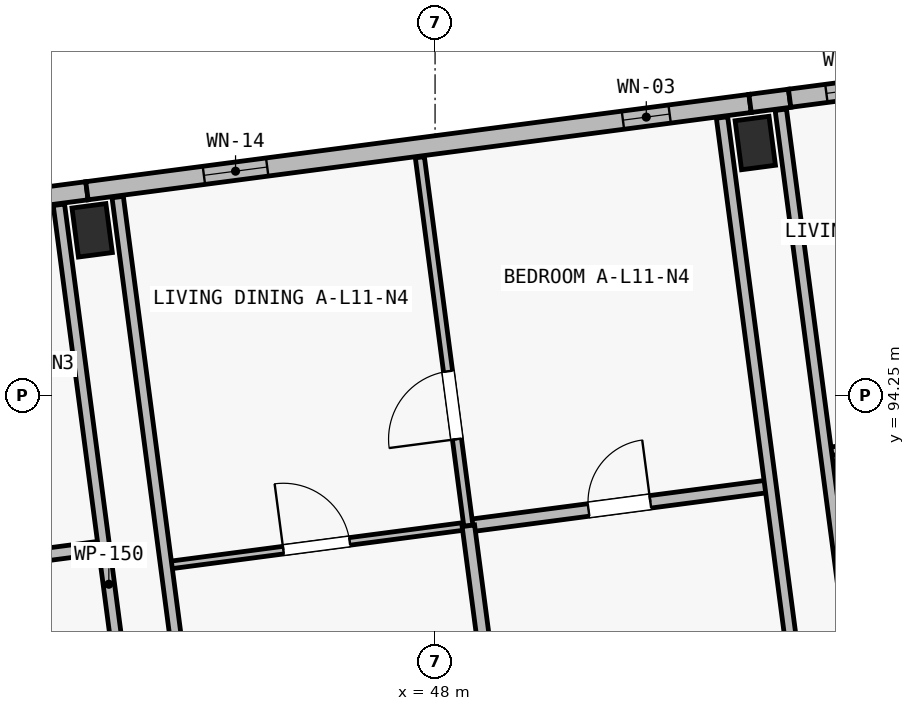
"""IFC4 building model, lengths in metres.
Left out: names, types, materials, properties, quantities, classifications, styles, units other than length and angle.
Written with IfcOpenShell. Run it as: python <this file> out.ifc"""

import sys

from ifc_helpers import new_model, si_unit, direction, frame, frame_2d, origin, origin_2d, place, context, subcontext, project, spatial, polyline, rectangle, outline, extrude, element, fill, save


model = new_model("IFC4")
c1 = context("Model", 3, precision=1e-05, world=origin(), true_north=direction((0.0, 1.0)))
c2 = subcontext(c1, "Body", "Model", "MODEL_VIEW")
j1 = project(units=[si_unit("LENGTHUNIT", "METRE"), si_unit("PLANEANGLEUNIT", "RADIAN")], contexts=[c1])
p1 = place(None, origin())
s1 = spatial("IfcSite", under=j1, at=p1, CompositionType="ELEMENT")
p2 = place(p1, origin())
s2 = spatial("IfcBuilding", under=s1, at=p2, CompositionType="ELEMENT")
p3 = place(p2, frame((0.0, 0.0, 37.65)))
s3 = spatial("IfcBuildingStorey", under=s2, at=p3, CompositionType="ELEMENT", Elevation=37.65)
for number, where, z_axis, x_axis in (
    (1, (43.488, 96.423, 0.0), (0.0, 0.0, 1.0), (0.991, 0.131, 0.0)),
    (2, (52.213, 97.572, 0.0), (0.0, 0.0, 1.0), (0.991, 0.131, 0.0)),
):
    element("IfcColumn", number, at=place(p3, frame(where, z_axis=z_axis, x_axis=x_axis)), inside=s3, PredefinedType="COLUMN", context=c2, shape_type="SweptSolid", body=[
        extrude(rectangle(XDim=0.45, YDim=0.65, at=origin_2d()), origin(), (0.0, 0.0, 1.0), 3.25),
    ])
p4 = place(p3, frame((34.695, 95.795, 0.0), z_axis=(0.0, 0.0, 1.0), x_axis=(0.991447967712, 0.130502595073, 0.0)))
e3 = element("IfcWall", 3, at=p4, inside=s3, PredefinedType="SOLIDWALL", context=c2, shape_type="SweptSolid", body=[
    extrude(rectangle(XDim=8.8, YDim=0.24, at=frame_2d((4.4, 0.0))), origin(), (0.0, 0.0, 1.0), 3.0),
])
p5 = place(p4, frame((2.194, 0.0, 0.44)))
e4 = element("IfcOpeningElement", 4, at=p5, cuts=e3, PredefinedType="OPENING", context=c2, shape_type="SweptSolid", body=[
    extrude(rectangle(XDim=0.7, YDim=2.36, at=frame_2d((0.35, 1.18))), frame((0.0, 0.135, 0.0), z_axis=(0.0, -1.0, 0.0), x_axis=(1.0, 0.0, 0.0)), (0.0, 0.0, 1.0), 0.27),
])
p6 = place(p4, frame((5.849, 0.0, 0.5)))
e5 = element("IfcOpeningElement", 5, at=p6, cuts=e3, PredefinedType="OPENING", context=c2, shape_type="SweptSolid", body=[
    extrude(rectangle(XDim=0.78, YDim=2.2, at=frame_2d((0.39, 1.1))), frame((0.0, 0.135, 0.0), z_axis=(0.0, -1.0, 0.0), x_axis=(1.0, 0.0, 0.0)), (0.0, 0.0, 1.0), 0.27),
])
p7 = place(p3, frame((43.42, 96.944, 0.0), z_axis=(0.0, 0.0, 1.0), x_axis=(0.991443905089, 0.130533455715, 0.0)))
e6 = element("IfcWall", 6, at=p7, inside=s3, PredefinedType="SOLIDWALL", context=c2, shape_type="SweptSolid", body=[
    extrude(rectangle(XDim=8.8, YDim=0.24, at=frame_2d((4.4, 0.0))), origin(), (0.0, 0.0, 1.0), 3.0),
])
p8 = place(p7, frame((1.552, 0.0, 0.5)))
e7 = element("IfcOpeningElement", 7, at=p8, cuts=e6, PredefinedType="OPENING", context=c2, shape_type="SweptSolid", body=[
    extrude(rectangle(XDim=0.84, YDim=2.28, at=frame_2d((0.42, 1.14))), frame((0.0, 0.135, 0.0), z_axis=(0.0, -1.0, 0.0), x_axis=(1.0, 0.0, 0.0)), (0.0, 0.0, 1.0), 0.27),
])
p9 = place(p7, frame((7.113, 0.0, 0.44)))
e8 = element("IfcOpeningElement", 8, at=p9, cuts=e6, PredefinedType="OPENING", context=c2, shape_type="SweptSolid", body=[
    extrude(rectangle(XDim=0.62, YDim=2.28, at=frame_2d((0.31, 1.14))), frame((0.0, 0.135, 0.0), z_axis=(0.0, -1.0, 0.0), x_axis=(1.0, 0.0, 0.0)), (0.0, 0.0, 1.0), 0.27),
])
p10 = place(p3, frame((52.145, 98.093, 0.0), z_axis=(0.0, 0.0, 1.0), x_axis=(0.991425781816, 0.130671034095, 0.0)))
e9 = element("IfcWall", 9, at=p10, inside=s3, PredefinedType="SOLIDWALL", context=c2, shape_type="SweptSolid", body=[
    extrude(rectangle(XDim=0.525, YDim=0.24, at=frame_2d((0.262, 0.0))), origin(), (0.0, 0.0, 1.0), 3.0),
])
p11 = place(p3, frame((52.665, 98.161, 0.0), z_axis=(0.0, 0.0, 1.0), x_axis=(0.991443905089, 0.130533455715, 0.0)))
e10 = element("IfcWall", 10, at=p11, inside=s3, PredefinedType="SOLIDWALL", context=c2, shape_type="SweptSolid", body=[
    extrude(outline(polyline([(0.0, 0.0), (8.8, 0.0), (8.8, 5.083), (0.0, 6.573), (0.0, 0.0)])), frame((0.0, 0.12, 0.0), z_axis=(0.0, -1.0, 0.0), x_axis=(1.0, 0.0, 0.0)), (0.0, 0.0, 1.0), 0.24),
])
p12 = place(p11, frame((0.488, 0.0, 0.44)))
e11 = element("IfcOpeningElement", 11, at=p12, cuts=e10, PredefinedType="OPENING", context=c2, shape_type="SweptSolid", body=[
    extrude(rectangle(XDim=0.68, YDim=2.24, at=frame_2d((0.34, 1.12))), frame((0.0, 0.135, 0.0), z_axis=(0.0, -1.0, 0.0), x_axis=(1.0, 0.0, 0.0)), (0.0, 0.0, 1.0), 0.27),
])
p13 = place(p11, frame((5.923, 0.0, 0.5)))
e12 = element("IfcOpeningElement", 12, at=p13, cuts=e10, PredefinedType="OPENING", context=c2, shape_type="SweptSolid", body=[
    extrude(rectangle(XDim=0.76, YDim=2.34, at=frame_2d((0.38, 1.17))), frame((0.0, 0.135, 0.0), z_axis=(0.0, -1.0, 0.0), x_axis=(1.0, 0.0, 0.0)), (0.0, 0.0, 1.0), 0.27),
])
p14 = place(p3, frame((39.668, 91.735, 0.0), z_axis=(0.0, 0.0, 1.0), x_axis=(0.991443516139, 0.130536409887, 0.0)))
e13 = element("IfcWall", 13, at=p14, inside=s3, PredefinedType="PLUMBINGWALL", context=c2, shape_type="SweptSolid", body=[
    extrude(rectangle(XDim=4.01, YDim=0.165, at=frame_2d((2.005, 0.0))), origin(), (0.0, 0.0, 1.0), 2.97),
])
p15 = place(p14, frame((1.595, 0.0, 0.0)))
e14 = element("IfcOpeningElement", 14, at=p15, cuts=e13, PredefinedType="OPENING", context=c2, shape_type="SweptSolid", body=[
    extrude(rectangle(XDim=0.82, YDim=2.08, at=frame_2d((0.41, 1.04))), frame((0.0, 0.097, 0.0), z_axis=(0.0, -1.0, 0.0), x_axis=(1.0, 0.0, 0.0)), (0.0, 0.0, 1.0), 0.195),
])
p16 = place(p3, frame((44.365, 86.775, 0.0), z_axis=(0.0, 0.0, 1.0), x_axis=(-0.130531024319, 0.991444225204, 0.0)))
e15 = element("IfcWall", 15, at=p16, inside=s3, PredefinedType="PARTITIONING", context=c2, shape_type="SweptSolid", body=[
    extrude(rectangle(XDim=10.07, YDim=0.15, at=frame_2d((5.035, 0.0))), origin(), (0.0, 0.0, 1.0), 2.97),
])
p17 = place(p3, frame((44.462, 92.013, 0.0), z_axis=(0.0, 0.0, 1.0), x_axis=(0.991451394038, 0.130476562111, 0.0)))
e16 = element("IfcWall", 16, at=p17, inside=s3, PredefinedType="PARTITIONING", context=c2, shape_type="SweptSolid", body=[
    extrude(rectangle(XDim=4.01, YDim=0.1, at=frame_2d((2.005, 0.0))), origin(), (0.0, 0.0, 1.0), 2.97),
])
p18 = place(p17, frame((1.555, 0.0, 0.0)))
e17 = element("IfcOpeningElement", 17, at=p18, cuts=e16, PredefinedType="OPENING", context=c2, shape_type="SweptSolid", body=[
    extrude(rectangle(XDim=0.88, YDim=2.1, at=frame_2d((0.44, 1.05))), frame((0.0, 0.065, 0.0), z_axis=(0.0, -1.0, 0.0), x_axis=(1.0, 0.0, 0.0)), (0.0, 0.0, 1.0), 0.13),
])
p19 = place(p3, frame((48.438, 92.536, 0.0), z_axis=(0.0, 0.0, 1.0), x_axis=(0.991444553502, 0.130528530716, 0.0)))
e18 = element("IfcWall", 18, at=p19, inside=s3, PredefinedType="PLUMBINGWALL", context=c2, shape_type="SweptSolid", body=[
    extrude(rectangle(XDim=4.01, YDim=0.165, at=frame_2d((2.005, 0.0))), origin(), (0.0, 0.0, 1.0), 2.97),
])
p20 = place(p19, frame((1.595, 0.0, 0.0)))
e19 = element("IfcOpeningElement", 19, at=p20, cuts=e18, PredefinedType="OPENING", context=c2, shape_type="SweptSolid", body=[
    extrude(rectangle(XDim=0.82, YDim=2.08, at=frame_2d((0.41, 1.04))), frame((0.0, 0.097, 0.0), z_axis=(0.0, -1.0, 0.0), x_axis=(1.0, 0.0, 0.0)), (0.0, 0.0, 1.0), 0.195),
])
p21 = place(p3, frame((48.438, 92.536, 0.0), z_axis=(0.0, 0.0, 1.0), x_axis=(-0.130508755558, 0.991447156798, 0.0)))
e20 = element("IfcWall", 20, at=p21, inside=s3, PredefinedType="PARTITIONING", context=c2, shape_type="SweptSolid", body=[
    extrude(rectangle(XDim=4.89, YDim=0.12, at=frame_2d((2.445, 0.0))), origin(), (0.0, 0.0, 1.0), 2.97),
])
p22 = place(p21, frame((1.15, 0.0, 0.0)))
e21 = element("IfcOpeningElement", 21, at=p22, cuts=e20, PredefinedType="OPENING", context=c2, shape_type="SweptSolid", body=[
    extrude(rectangle(XDim=0.9, YDim=2.1, at=frame_2d((0.45, 1.05))), frame((0.0, 0.075, 0.0), z_axis=(0.0, -1.0, 0.0), x_axis=(1.0, 0.0, 0.0)), (0.0, 0.0, 1.0), 0.15),
])
p23 = place(p3, frame((49.114, 87.401, 0.0), z_axis=(0.0, 0.0, 1.0), x_axis=(-0.130558146496, 0.99144065399, 0.0)))
e22 = element("IfcWall", 22, at=p23, inside=s3, PredefinedType="PLUMBINGWALL", context=c2, shape_type="SweptSolid", body=[
    extrude(rectangle(XDim=5.18, YDim=0.165, at=frame_2d((2.59, 0.0))), origin(), (0.0, 0.0, 1.0), 2.97),
])
p24 = place(p3, frame((45.138, 86.877, 0.0), z_axis=(0.0, 0.0, 1.0), x_axis=(-0.130531024319, 0.991444225204, 0.0)))
e23 = element("IfcWall", 23, at=p24, inside=s3, PredefinedType="PARTITIONING", context=c2, shape_type="SweptSolid", body=[
    extrude(rectangle(XDim=10.07, YDim=0.15, at=frame_2d((5.035, 0.0))), origin(), (0.0, 0.0, 1.0), 2.97),
])
p25 = place(p3, frame((53.09, 87.924, 0.0), z_axis=(0.0, 0.0, 1.0), x_axis=(-0.130534161944, 0.991443812107, 0.0)))
e24 = element("IfcWall", 24, at=p25, inside=s3, PredefinedType="PARTITIONING", context=c2, shape_type="SweptSolid", body=[
    extrude(rectangle(XDim=10.07, YDim=0.15, at=frame_2d((5.035, 0.0))), origin(), (0.0, 0.0, 1.0), 2.97),
])
p26 = place(p3, frame((53.141, 93.509, 0.0), z_axis=(0.0, 0.0, 1.0), x_axis=(0.991444553502, 0.130528530716, 0.0)))
e25 = element("IfcWall", 25, at=p26, inside=s3, PredefinedType="PARTITIONING", context=c2, shape_type="SweptSolid", body=[
    extrude(rectangle(XDim=4.01, YDim=0.11, at=frame_2d((2.005, 0.0))), origin(), (0.0, 0.0, 1.0), 2.97),
])
p27 = place(p26, frame((1.555, 0.0, 0.0)))
e26 = element("IfcOpeningElement", 26, at=p27, cuts=e25, PredefinedType="OPENING", context=c2, shape_type="SweptSolid", body=[
    extrude(rectangle(XDim=0.9, YDim=2.1, at=frame_2d((0.45, 1.05))), frame((0.0, 0.07, 0.0), z_axis=(0.0, -1.0, 0.0), x_axis=(1.0, 0.0, 0.0)), (0.0, 0.0, 1.0), 0.14),
])
p28 = place(p3, frame((53.863, 88.026, 0.0), z_axis=(0.0, 0.0, 1.0), x_axis=(-0.130534161944, 0.991443812107, 0.0)))
e27 = element("IfcWall", 27, at=p28, inside=s3, PredefinedType="PARTITIONING", context=c2, shape_type="SweptSolid", body=[
    extrude(rectangle(XDim=10.07, YDim=0.15, at=frame_2d((5.035, 0.0))), origin(), (0.0, 0.0, 1.0), 2.97),
])
p29 = place(p8, origin())
e28 = element("IfcWindow", 28, at=p29, inside=s3, PartitioningType="SINGLE_PANEL", PredefinedType="WINDOW", context=c2, shape_type="SweptSolid", body=[
    extrude(rectangle(XDim=0.84, YDim=2.28, at=frame_2d((0.42, 1.14))), frame((0.0, 0.03, 0.0), z_axis=(0.0, -1.0, 0.0), x_axis=(1.0, 0.0, 0.0)), (0.0, 0.0, 1.0), 0.06),
])
fill(e7, e28)
p30 = place(p9, origin())
e29 = element("IfcWindow", 29, at=p30, inside=s3, PartitioningType="SINGLE_PANEL", PredefinedType="WINDOW", context=c2, shape_type="SweptSolid", body=[
    extrude(rectangle(XDim=0.62, YDim=2.28, at=frame_2d((0.31, 1.14))), frame((0.0, 0.03, 0.0), z_axis=(0.0, -1.0, 0.0), x_axis=(1.0, 0.0, 0.0)), (0.0, 0.0, 1.0), 0.06),
])
fill(e8, e29)
p31 = place(p12, origin())
e30 = element("IfcWindow", 30, at=p31, inside=s3, PartitioningType="SINGLE_PANEL", PredefinedType="WINDOW", context=c2, shape_type="SweptSolid", body=[
    extrude(rectangle(XDim=0.68, YDim=2.24, at=frame_2d((0.34, 1.12))), frame((0.0, 0.03, 0.0), z_axis=(0.0, -1.0, 0.0), x_axis=(1.0, 0.0, 0.0)), (0.0, 0.0, 1.0), 0.06),
])
fill(e11, e30)
p32 = place(p18, origin())
e31 = element("IfcDoor", 31, at=p32, inside=s3, OperationType="SINGLE_SWING_LEFT", PredefinedType="DOOR", context=c2, shape_type="SweptSolid", body=[
    extrude(rectangle(XDim=0.88, YDim=2.1, at=frame_2d((0.44, 1.05))), frame((0.0, 0.025, 0.0), z_axis=(0.0, -1.0, 0.0), x_axis=(1.0, 0.0, 0.0)), (0.0, 0.0, 1.0), 0.05),
])
fill(e17, e31)
p33 = place(p20, origin())
e32 = element("IfcDoor", 32, at=p33, inside=s3, OperationType="SINGLE_SWING_RIGHT", PredefinedType="DOOR", context=c2, shape_type="SweptSolid", body=[
    extrude(rectangle(XDim=0.82, YDim=2.08, at=frame_2d((0.41, 1.04))), frame((0.0, 0.025, 0.0), z_axis=(0.0, -1.0, 0.0), x_axis=(1.0, 0.0, 0.0)), (0.0, 0.0, 1.0), 0.05),
])
fill(e19, e32)
p34 = place(p22, origin())
e33 = element("IfcDoor", 33, at=p34, inside=s3, OperationType="SINGLE_SWING_LEFT", PredefinedType="DOOR", context=c2, shape_type="SweptSolid", body=[
    extrude(rectangle(XDim=0.9, YDim=2.1, at=frame_2d((0.45, 1.05))), frame((0.0, 0.025, 0.0), z_axis=(0.0, -1.0, 0.0), x_axis=(1.0, 0.0, 0.0)), (0.0, 0.0, 1.0), 0.05),
])
fill(e21, e33)
save(model, sys.argv[1])
